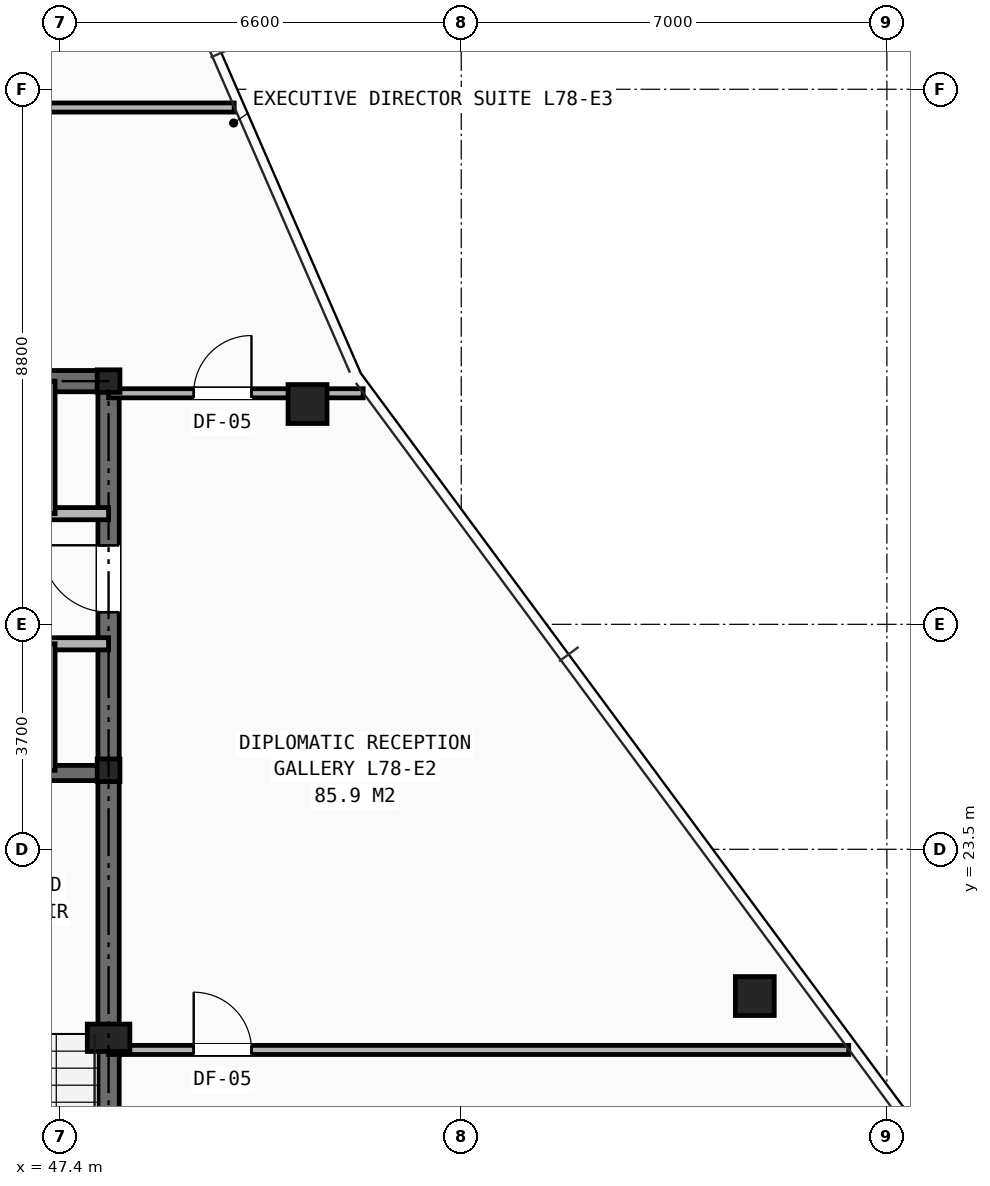
"""IFC4 building model, lengths in metres.
Left out: names, types, materials, properties, quantities, classifications, styles, units other than length and angle.
Written with IfcOpenShell. Run it as: python <this file> out.ifc"""

import sys

from ifc_helpers import new_model, si_unit, direction, frame, frame_2d, origin, origin_2d, place, context, subcontext, project, spatial, rectangle, hollow_rectangle, i_section, extrude, element, fill, save


model = new_model("IFC4")
c1 = context("Model", 3, precision=1e-05, world=origin(), true_north=direction((0.0, 1.0)))
c2 = subcontext(c1, "Body", "Model", "MODEL_VIEW")
j1 = project(units=[si_unit("LENGTHUNIT", "METRE"), si_unit("PLANEANGLEUNIT", "RADIAN")], contexts=[c1])
p1 = place(None, origin())
s1 = spatial("IfcSite", under=j1, at=p1, CompositionType="ELEMENT")
p2 = place(p1, origin())
s2 = spatial("IfcBuilding", under=s1, at=p2, CompositionType="ELEMENT")
p3 = place(p2, frame((0.0, 0.0, 276.0)))
s3 = spatial("IfcBuildingStorey", under=s2, at=p3, CompositionType="ELEMENT", Elevation=276.0)
for number, where, z_axis, x_axis in (
    (1, (48.2, 24.8, 0.0), (0.0, 0.0, 1.0), (1.0, 0.0, 0.0)),
    (2, (48.2, 31.2, 0.0), (0.0, 0.0, 1.0), (1.0, 0.0, 0.0)),
):
    element("IfcColumn", number, at=place(p3, frame(where, z_axis=z_axis, x_axis=x_axis)), inside=s3, PredefinedType="COLUMN", context=c2, shape_type="SweptSolid", body=[
        extrude(i_section(OverallWidth=0.374, OverallDepth=0.372, WebThickness=0.016, FlangeThickness=0.026, at=origin_2d()), origin(), (0.0, 0.0, 1.0), 3.5),
    ])
p4 = place(p3, frame((48.2, 20.4, 0.0), z_axis=(0.0, 0.0, 1.0), x_axis=(1.0, 0.0, 0.0)))
e3 = element("IfcColumn", 3, at=p4, inside=s3, PredefinedType="PILASTER", context=c2, shape_type="SweptSolid", body=[
    extrude(rectangle(XDim=0.7, YDim=0.45, at=origin_2d()), origin(), (0.0, 0.0, 1.0), 3.5),
])
for number, where, z_axis, x_axis in (
    (4, (58.827, 21.086, 0.0), (0.0, 0.0, 1.0), (1.0, 0.0, 0.0)),
    (5, (51.472, 30.823, 0.0), (0.0, 0.0, 1.0), (1.0, 0.0, 0.0)),
):
    element("IfcColumn", number, at=place(p3, frame(where, z_axis=z_axis, x_axis=x_axis)), inside=s3, PredefinedType="COLUMN", context=c2, shape_type="SweptSolid", body=[
        extrude(hollow_rectangle(XDim=0.64, YDim=0.64, WallThickness=0.045, at=origin_2d()), origin(), (0.0, 0.0, 1.0), 3.5),
    ])
p5 = place(p3, frame((31.8, 31.2, 0.0), z_axis=(0.0, 0.0, 1.0), x_axis=(1.0, 0.0, 0.0)))
e6 = element("IfcWall", 6, at=p5, inside=s3, PredefinedType="SHEAR", context=c2, shape_type="SweptSolid", body=[
    extrude(rectangle(XDim=16.4, YDim=0.35, at=frame_2d((8.2, 0.0))), origin(), (0.0, 0.0, 1.0), 3.25),
])
p6 = place(p3, frame((48.2, 16.4, 0.0), z_axis=(0.0, 0.0, 1.0), x_axis=(0.0, 1.0, 0.0)))
e7 = element("IfcWall", 7, at=p6, inside=s3, PredefinedType="SHEAR", context=c2, shape_type="SweptSolid", body=[
    extrude(rectangle(XDim=14.8, YDim=0.35, at=frame_2d((7.4, 0.0))), origin(), (0.0, 0.0, 1.0), 3.25),
])
p7 = place(p6, frame((11.0, 0.0, 0.0)))
e8 = element("IfcOpeningElement", 8, at=p7, cuts=e7, PredefinedType="OPENING", context=c2, shape_type="SweptSolid", body=[
    extrude(rectangle(XDim=1.1, YDim=2.15, at=frame_2d((0.55, 1.075))), frame((0.0, 0.185, 0.0), z_axis=(0.0, -1.0, 0.0), x_axis=(1.0, 0.0, 0.0)), (0.0, 0.0, 1.0), 0.37),
])
p8 = place(p3, frame((44.955, 24.755, 0.0), z_axis=(0.0, 0.0, 1.0), x_axis=(1.0, 0.0, 0.0)))
e9 = element("IfcWall", 9, at=p8, inside=s3, PredefinedType="SHEAR", context=c2, shape_type="SweptSolid", body=[
    extrude(rectangle(XDim=3.245, YDim=0.25, at=frame_2d((1.623, 0.0))), origin(), (0.0, 0.0, 1.0), 3.25),
])
p9 = place(p3, frame((31.8, 29.02, 0.0), z_axis=(0.0, 0.0, 1.0), x_axis=(1.0, 0.0, 0.0)))
e10 = element("IfcWall", 10, at=p9, inside=s3, PredefinedType="SOLIDWALL", context=c2, shape_type="SweptSolid", body=[
    extrude(rectangle(XDim=16.4, YDim=0.2, at=frame_2d((8.2, 0.0))), origin(), (0.0, 0.0, 1.0), 2.705),
])
p10 = place(p9, frame((0.55, 0.0, 0.0)))
e11 = element("IfcOpeningElement", 11, at=p10, cuts=e10, PredefinedType="OPENING", context=c2, shape_type="SweptSolid", body=[
    extrude(rectangle(XDim=0.85, YDim=2.05, at=frame_2d((0.425, 1.025))), frame((0.0, 0.11, 0.0), z_axis=(0.0, -1.0, 0.0), x_axis=(1.0, 0.0, 0.0)), (0.0, 0.0, 1.0), 0.22),
])
p11 = place(p9, frame((5.94, 0.0, 0.0)))
e12 = element("IfcOpeningElement", 12, at=p11, cuts=e10, PredefinedType="OPENING", context=c2, shape_type="SweptSolid", body=[
    extrude(rectangle(XDim=0.9, YDim=2.1, at=frame_2d((0.45, 1.05))), frame((0.0, 0.11, 0.0), z_axis=(0.0, -1.0, 0.0), x_axis=(1.0, 0.0, 0.0)), (0.0, 0.0, 1.0), 0.22),
])
p12 = place(p9, frame((11.41, 0.0, 0.0)))
e13 = element("IfcOpeningElement", 13, at=p12, cuts=e10, PredefinedType="OPENING", context=c2, shape_type="SweptSolid", body=[
    extrude(rectangle(XDim=1.1, YDim=2.15, at=frame_2d((0.55, 1.075))), frame((0.0, 0.11, 0.0), z_axis=(0.0, -1.0, 0.0), x_axis=(1.0, 0.0, 0.0)), (0.0, 0.0, 1.0), 0.22),
])
p13 = place(p9, frame((13.73, 0.0, 0.0)))
e14 = element("IfcOpeningElement", 14, at=p13, cuts=e10, PredefinedType="OPENING", context=c2, shape_type="SweptSolid", body=[
    extrude(rectangle(XDim=1.1, YDim=2.15, at=frame_2d((0.55, 1.075))), frame((0.0, 0.11, 0.0), z_axis=(0.0, -1.0, 0.0), x_axis=(1.0, 0.0, 0.0)), (0.0, 0.0, 1.0), 0.22),
])
p14 = place(p3, frame((33.82, 26.88, 0.0), z_axis=(0.0, 0.0, 1.0), x_axis=(1.0, 0.0, 0.0)))
e15 = element("IfcWall", 15, at=p14, inside=s3, PredefinedType="SOLIDWALL", context=c2, shape_type="SweptSolid", body=[
    extrude(rectangle(XDim=14.38, YDim=0.2, at=frame_2d((7.19, 0.0))), origin(), (0.0, 0.0, 1.0), 2.705),
])
p15 = place(p14, frame((3.92, 0.0, 0.0)))
e16 = element("IfcOpeningElement", 16, at=p15, cuts=e15, PredefinedType="OPENING", context=c2, shape_type="SweptSolid", body=[
    extrude(rectangle(XDim=0.9, YDim=2.1, at=frame_2d((0.45, 1.05))), frame((0.0, 0.11, 0.0), z_axis=(0.0, -1.0, 0.0), x_axis=(1.0, 0.0, 0.0)), (0.0, 0.0, 1.0), 0.22),
])
p16 = place(p14, frame((9.39, 0.0, 0.0)))
e17 = element("IfcOpeningElement", 17, at=p16, cuts=e15, PredefinedType="OPENING", context=c2, shape_type="SweptSolid", body=[
    extrude(rectangle(XDim=1.1, YDim=2.15, at=frame_2d((0.55, 1.075))), frame((0.0, 0.11, 0.0), z_axis=(0.0, -1.0, 0.0), x_axis=(1.0, 0.0, 0.0)), (0.0, 0.0, 1.0), 0.22),
])
p17 = place(p14, frame((11.71, 0.0, 0.0)))
e18 = element("IfcOpeningElement", 18, at=p17, cuts=e15, PredefinedType="OPENING", context=c2, shape_type="SweptSolid", body=[
    extrude(rectangle(XDim=1.1, YDim=2.15, at=frame_2d((0.55, 1.075))), frame((0.0, 0.11, 0.0), z_axis=(0.0, -1.0, 0.0), x_axis=(1.0, 0.0, 0.0)), (0.0, 0.0, 1.0), 0.22),
])
p18 = place(p3, frame((47.24, 29.02, 0.0), z_axis=(0.0, 0.0, 1.0), x_axis=(0.0, 1.0, 0.0)))
e19 = element("IfcWall", 19, at=p18, inside=s3, PredefinedType="SOLIDWALL", context=c2, shape_type="SweptSolid", body=[
    extrude(rectangle(XDim=2.18, YDim=0.16, at=frame_2d((1.09, 0.0))), origin(), (0.0, 0.0, 1.0), 2.705),
])
p19 = place(p3, frame((47.24, 24.8, 0.0), z_axis=(0.0, 0.0, 1.0), x_axis=(0.0, 1.0, 0.0)))
e20 = element("IfcWall", 20, at=p19, inside=s3, PredefinedType="SOLIDWALL", context=c2, shape_type="SweptSolid", body=[
    extrude(rectangle(XDim=2.08, YDim=0.16, at=frame_2d((1.04, 0.0))), origin(), (0.0, 0.0, 1.0), 3.25),
])
p20 = place(p3, frame((46.8, 35.7, 0.0), z_axis=(0.0, 0.0, 1.0), x_axis=(1.0, 0.0, 0.0)))
e21 = element("IfcWall", 21, at=p20, inside=s3, PredefinedType="PARTITIONING", context=c2, shape_type="SweptSolid", body=[
    extrude(rectangle(XDim=3.466, YDim=0.15, at=frame_2d((1.733, 0.0))), origin(), (0.0, 0.0, 1.0), 2.628),
])
p21 = place(p3, frame((48.2, 20.2, 0.0), z_axis=(0.0, 0.0, 1.0), x_axis=(1.0, 0.0, 0.0)))
e22 = element("IfcWall", 22, at=p21, inside=s3, PredefinedType="PARTITIONING", context=c2, shape_type="SweptSolid", body=[
    extrude(rectangle(XDim=12.172, YDim=0.15, at=frame_2d((6.086, 0.0))), origin(), (0.0, 0.0, 1.0), 2.292),
])
p22 = place(p21, frame((1.4, 0.0, 0.0)))
e23 = element("IfcOpeningElement", 23, at=p22, cuts=e22, PredefinedType="OPENING", context=c2, shape_type="SweptSolid", body=[
    extrude(rectangle(XDim=0.95, YDim=2.1, at=frame_2d((0.475, 1.05))), frame((0.0, 0.085, 0.0), z_axis=(0.0, -1.0, 0.0), x_axis=(1.0, 0.0, 0.0)), (0.0, 0.0, 1.0), 0.17),
])
p23 = place(p3, frame((48.2, 31.0, 0.0), z_axis=(0.0, 0.0, 1.0), x_axis=(1.0, 0.0, 0.0)))
e24 = element("IfcWall", 24, at=p23, inside=s3, PredefinedType="PARTITIONING", context=c2, shape_type="SweptSolid", body=[
    extrude(rectangle(XDim=4.187, YDim=0.15, at=frame_2d((2.093, 0.0))), origin(), (0.0, 0.0, 1.0), 2.292),
])
p24 = place(p23, frame((1.4, 0.0, 0.0)))
e25 = element("IfcOpeningElement", 25, at=p24, cuts=e24, PredefinedType="OPENING", context=c2, shape_type="SweptSolid", body=[
    extrude(rectangle(XDim=0.95, YDim=2.1, at=frame_2d((0.475, 1.05))), frame((0.0, 0.085, 0.0), z_axis=(0.0, -1.0, 0.0), x_axis=(1.0, 0.0, 0.0)), (0.0, 0.0, 1.0), 0.17),
])
p25 = place(p7, origin())
e26 = element("IfcDoor", 26, at=p25, inside=s3, OperationType="SINGLE_SWING_RIGHT", PredefinedType="DOOR", context=c2, shape_type="SweptSolid", body=[
    extrude(rectangle(XDim=1.1, YDim=2.15, at=frame_2d((0.55, 1.075))), frame((0.0, 0.025, 0.0), z_axis=(0.0, -1.0, 0.0), x_axis=(1.0, 0.0, 0.0)), (0.0, 0.0, 1.0), 0.05),
])
fill(e8, e26)
p26 = place(p22, origin())
e27 = element("IfcDoor", 27, at=p26, inside=s3, OperationType="SINGLE_SWING_LEFT", PredefinedType="DOOR", context=c2, shape_type="SweptSolid", body=[
    extrude(rectangle(XDim=0.95, YDim=2.1, at=frame_2d((0.475, 1.05))), frame((0.0, 0.025, 0.0), z_axis=(0.0, -1.0, 0.0), x_axis=(1.0, 0.0, 0.0)), (0.0, 0.0, 1.0), 0.05),
])
fill(e23, e27)
p27 = place(p24, origin())
e28 = element("IfcDoor", 28, at=p27, inside=s3, OperationType="SINGLE_SWING_RIGHT", PredefinedType="DOOR", context=c2, shape_type="SweptSolid", body=[
    extrude(rectangle(XDim=0.95, YDim=2.1, at=frame_2d((0.475, 1.05))), frame((0.0, 0.025, 0.0), z_axis=(0.0, -1.0, 0.0), x_axis=(1.0, 0.0, 0.0)), (0.0, 0.0, 1.0), 0.05),
])
fill(e25, e28)
save(model, sys.argv[1])
